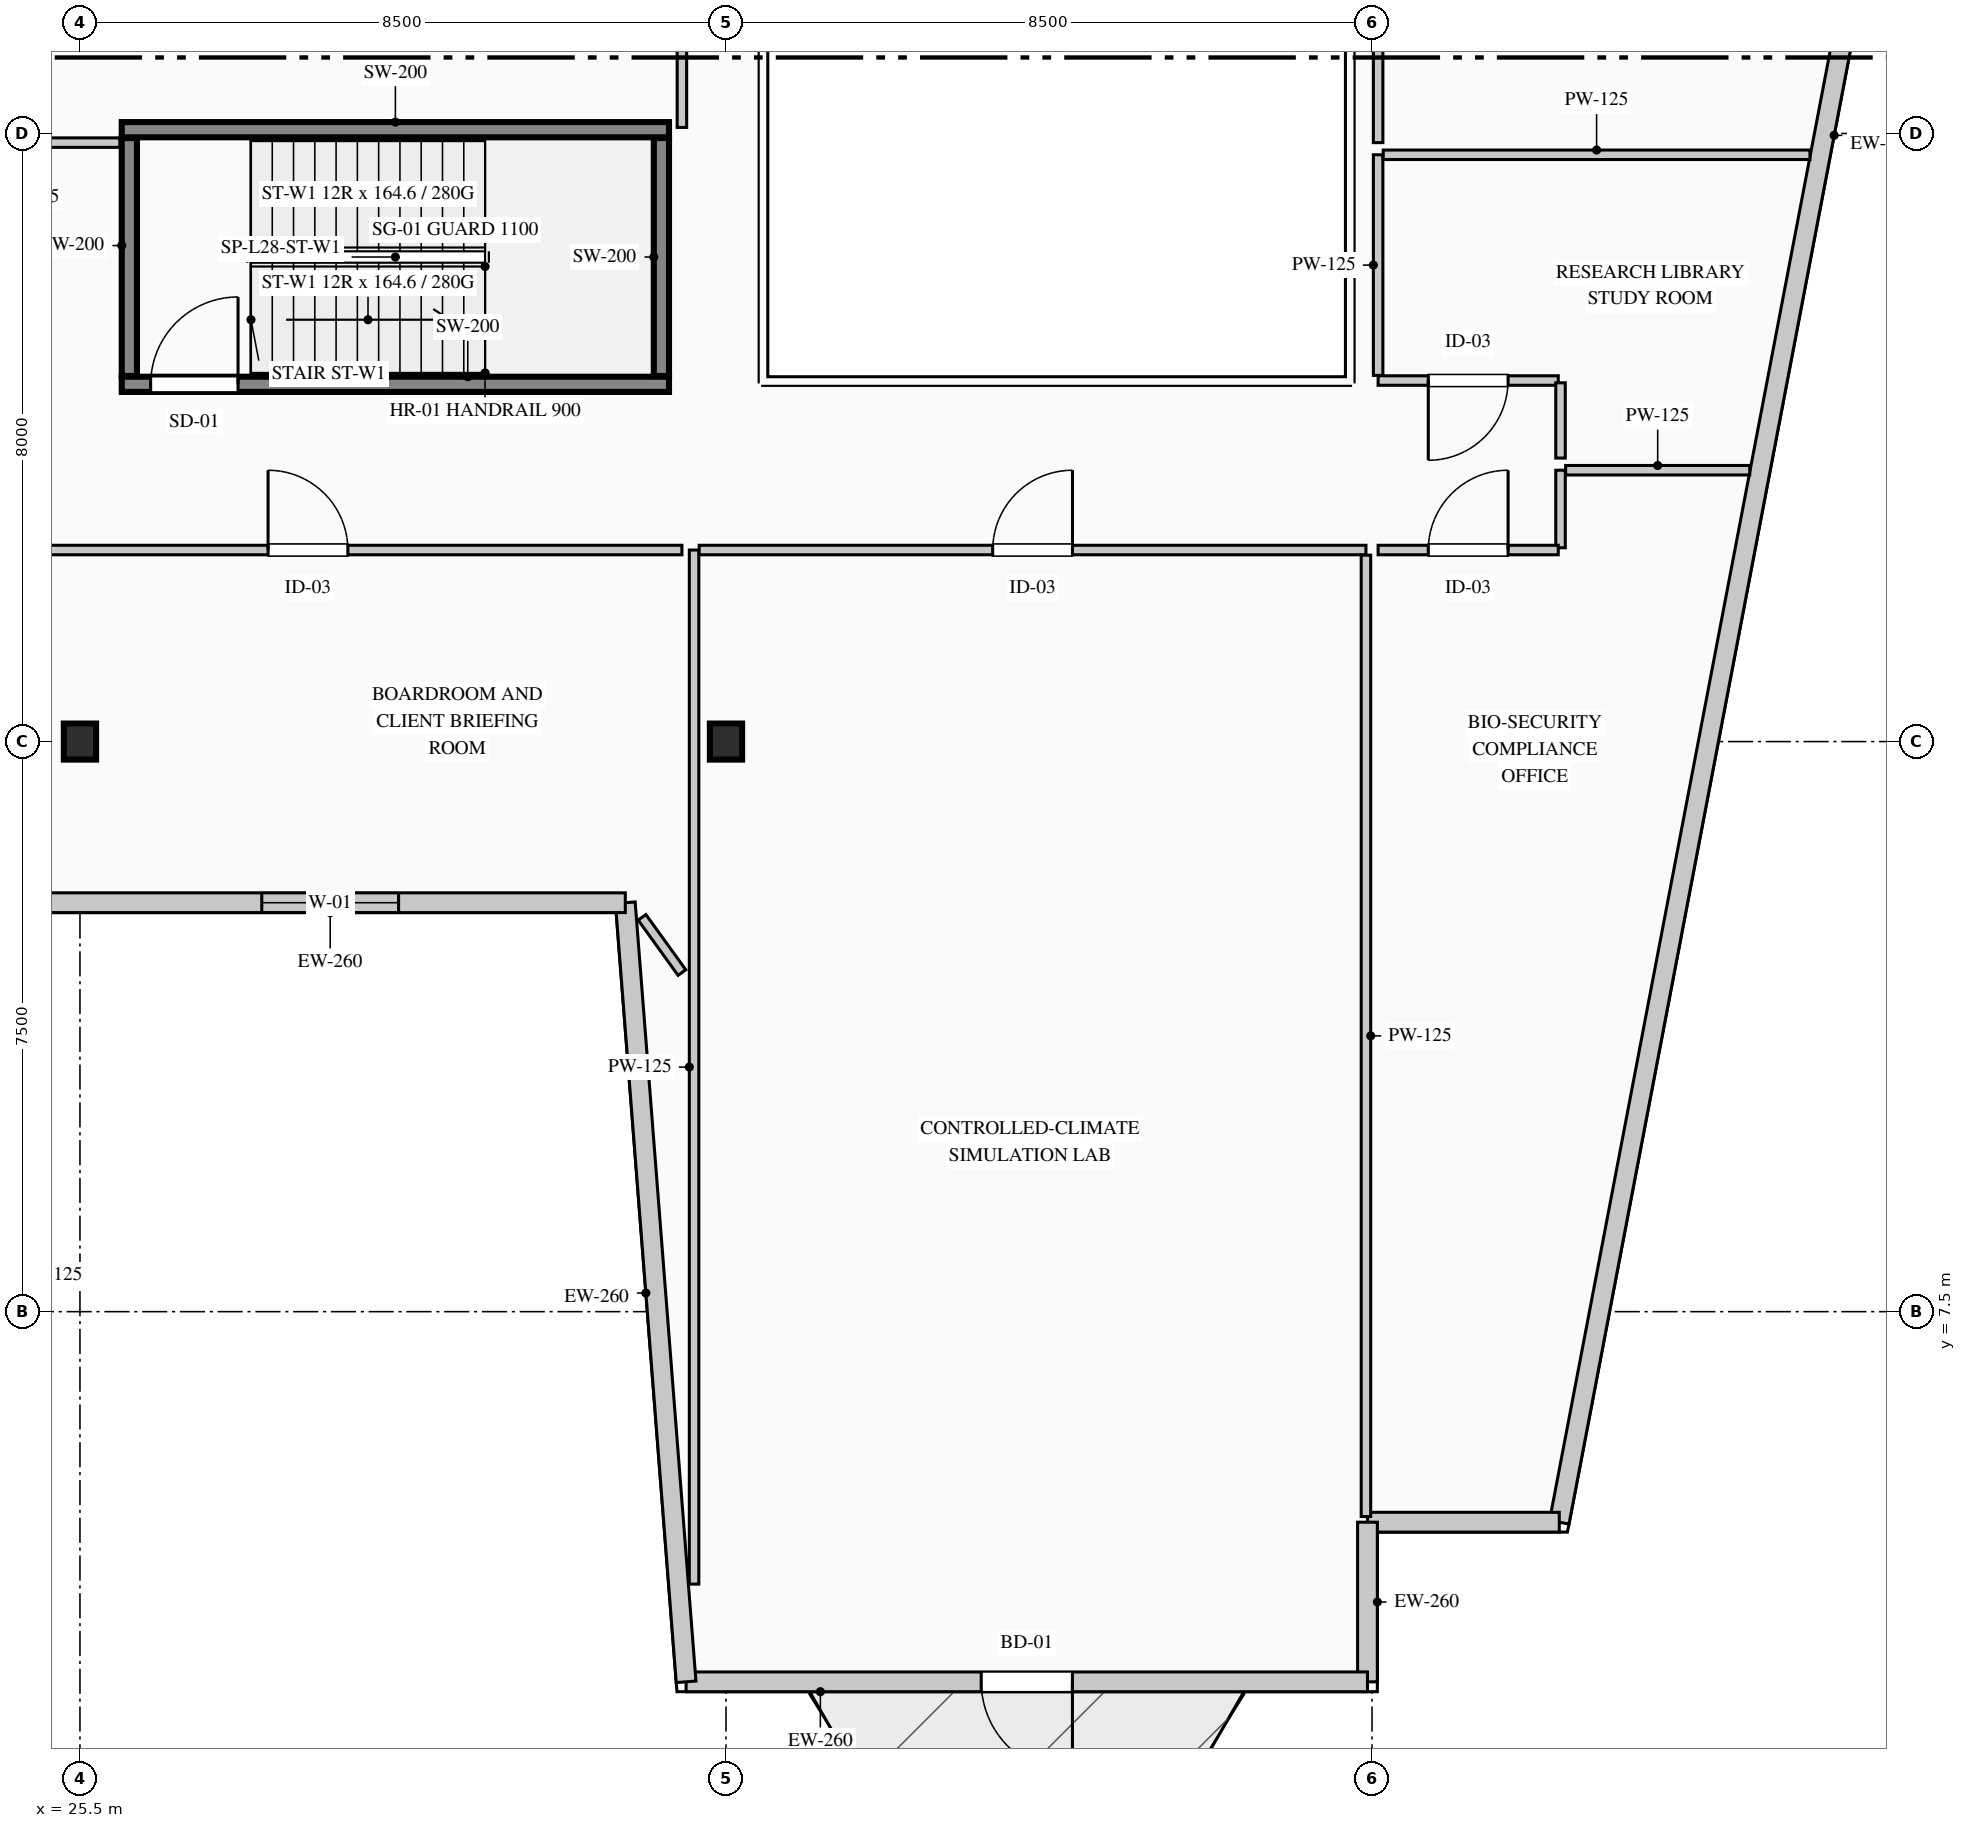
"""IFC4 building model, lengths in metres.
Left out: names, types, materials, properties, quantities, classifications, styles, units other than length and angle.
Written with IfcOpenShell. Run it as: python <this file> out.ifc"""

import sys

from ifc_helpers import new_model, si_unit, direction, frame, frame_2d, origin, origin_2d, place, context, subcontext, project, spatial, rectangle, i_section, extrude, element, fill, save


model = new_model("IFC4")
c1 = context("Model", 3, precision=1e-05, world=origin(), true_north=direction((0.0, 1.0)))
c2 = subcontext(c1, "Body", "Model", "MODEL_VIEW")
j1 = project(units=[si_unit("LENGTHUNIT", "METRE"), si_unit("PLANEANGLEUNIT", "RADIAN")], contexts=[c1])
p1 = place(None, origin())
s1 = spatial("IfcSite", under=j1, at=p1, CompositionType="ELEMENT")
p2 = place(p1, origin())
s2 = spatial("IfcBuilding", under=s1, at=p2, CompositionType="ELEMENT")
p3 = place(p2, frame((0.0, 0.0, 123.25)))
s3 = spatial("IfcBuildingStorey", under=s2, at=p3, CompositionType="ELEMENT", Elevation=123.25)
p4 = place(p3, frame((26.05, 19.7, 0.0), z_axis=(0.0, 0.0, 1.0), x_axis=(1.0, 0.0, 0.0)))
e1 = element("IfcWall", 1, at=p4, inside=s3, PredefinedType="SHEAR", context=c2, shape_type="SweptSolid", body=[
    extrude(rectangle(XDim=7.2, YDim=0.2, at=frame_2d((3.6, 0.0))), origin(), (0.0, 0.0, 1.0), 3.95),
])
p5 = place(p4, frame((0.38, 0.0, 0.0)))
e2 = element("IfcOpeningElement", 2, at=p5, cuts=e1, PredefinedType="OPENING", context=c2, shape_type="SweptSolid", body=[
    extrude(rectangle(XDim=1.15, YDim=2.2, at=frame_2d((0.575, 1.1))), frame((0.0, 0.11, 0.0), z_axis=(0.0, -1.0, 0.0), x_axis=(1.0, 0.0, 0.0)), (0.0, 0.0, 1.0), 0.22),
])
p6 = place(p3, frame((26.05, 23.05, 0.0), z_axis=(0.0, 0.0, 1.0), x_axis=(1.0, 0.0, 0.0)))
e3 = element("IfcWall", 3, at=p6, inside=s3, PredefinedType="SHEAR", context=c2, shape_type="SweptSolid", body=[
    extrude(rectangle(XDim=7.2, YDim=0.2, at=frame_2d((3.6, 0.0))), origin(), (0.0, 0.0, 1.0), 3.95),
])
for number, where, z_axis, x_axis in (
    (4, (26.15, 19.81, 0.0), (0.0, 0.0, 1.0), (0.0, 1.0, 0.0)),
    (5, (33.15, 19.81, 0.0), (0.0, 0.0, 1.0), (0.0, 1.0, 0.0)),
):
    element("IfcWall", number, at=place(p3, frame(where, z_axis=z_axis, x_axis=x_axis)), inside=s3, PredefinedType="SHEAR", context=c2, shape_type="SweptSolid", body=[
        extrude(rectangle(XDim=3.13, YDim=0.2, at=frame_2d((1.565, 0.0))), origin(), (0.0, 0.0, 1.0), 3.95),
    ])
for number, where, z_axis, x_axis in (
    (6, (25.5, 15.0, 0.0), (0.0, 0.0, 1.0), (1.0, 0.0, 0.0)),
    (7, (34.0, 15.0, 0.0), (0.0, 0.0, 1.0), (1.0, 0.0, 0.0)),
):
    element("IfcColumn", number, at=place(p3, frame(where, z_axis=z_axis, x_axis=x_axis)), inside=s3, PredefinedType="COLUMN", context=c2, shape_type="SweptSolid", body=[
        extrude(i_section(OverallWidth=0.424, OverallDepth=0.474, WebThickness=0.048, FlangeThickness=0.077, FilletRadius=0.015, at=origin_2d()), origin(), (0.0, 0.0, 1.0), 3.95),
    ])
p7 = place(p3, frame((51.942, 41.27, 0.0), z_axis=(0.0, 0.0, 1.0), x_axis=(-0.187592192405, -0.982247000173, 0.0)))
e8 = element("IfcWall", 8, at=p7, inside=s3, PredefinedType="STANDARD", context=c2, shape_type="SweptSolid", body=[
    extrude(rectangle(XDim=37.2, YDim=0.26, at=frame_2d((18.6, 0.0))), origin(), (0.0, 0.0, 1.0), 3.69),
])
p8 = place(p7, frame((12.342, 0.0, 0.9)))
e9 = element("IfcOpeningElement", 9, at=p8, cuts=e8, PredefinedType="OPENING", context=c2, shape_type="SweptSolid", body=[
    extrude(rectangle(XDim=2.1, YDim=2.0, at=frame_2d((1.05, 1.0))), frame((0.0, 0.14, 0.0), z_axis=(0.0, -1.0, 0.0), x_axis=(1.0, 0.0, 0.0)), (0.0, 0.0, 1.0), 0.28),
])
p9 = place(p3, frame((44.963, 4.73, 0.0), z_axis=(0.0, 0.0, 1.0), x_axis=(-1.0, 0.0, 0.0)))
e10 = element("IfcWall", 10, at=p9, inside=s3, PredefinedType="STANDARD", context=c2, shape_type="SweptSolid", body=[
    extrude(rectangle(XDim=2.523, YDim=0.26, at=frame_2d((1.262, 0.0))), origin(), (0.0, 0.0, 1.0), 3.69),
])
p10 = place(p3, frame((42.44, 4.73, 0.0), z_axis=(0.0, 0.0, 1.0), x_axis=(0.0, -1.0, 0.0)))
e11 = element("IfcWall", 11, at=p10, inside=s3, PredefinedType="STANDARD", context=c2, shape_type="SweptSolid", body=[
    extrude(rectangle(XDim=2.1, YDim=0.26, at=frame_2d((1.05, 0.0))), origin(), (0.0, 0.0, 1.0), 3.69),
])
p11 = place(p3, frame((42.44, 2.63, 0.0), z_axis=(0.0, 0.0, 1.0), x_axis=(-1.0, 0.0, 0.0)))
e12 = element("IfcWall", 12, at=p11, inside=s3, PredefinedType="STANDARD", context=c2, shape_type="SweptSolid", body=[
    extrude(rectangle(XDim=8.965, YDim=0.26, at=frame_2d((4.482, 0.0))), origin(), (0.0, 0.0, 1.0), 3.69),
])
p12 = place(p11, frame((3.882, 0.0, 0.0)))
e13 = element("IfcOpeningElement", 13, at=p12, cuts=e12, PredefinedType="OPENING", context=c2, shape_type="SweptSolid", body=[
    extrude(rectangle(XDim=1.2, YDim=2.2, at=frame_2d((0.6, 1.1))), frame((0.0, 0.14, 0.0), z_axis=(0.0, -1.0, 0.0), x_axis=(1.0, 0.0, 0.0)), (0.0, 0.0, 1.0), 0.28),
])
p13 = place(p3, frame((33.475, 2.63, 0.0), z_axis=(0.0, 0.0, 1.0), x_axis=(-0.077793257511, 0.996969512616, 0.0)))
e14 = element("IfcWall", 14, at=p13, inside=s3, PredefinedType="STANDARD", context=c2, shape_type="SweptSolid", body=[
    extrude(rectangle(XDim=10.281, YDim=0.26, at=frame_2d((5.141, 0.0))), origin(), (0.0, 0.0, 1.0), 3.69),
])
p14 = place(p3, frame((32.675, 12.88, 0.0), z_axis=(0.0, 0.0, 1.0), x_axis=(-1.0, 0.0, 0.0)))
e15 = element("IfcWall", 15, at=p14, inside=s3, PredefinedType="STANDARD", context=c2, shape_type="SweptSolid", body=[
    extrude(rectangle(XDim=7.765, YDim=0.26, at=frame_2d((3.883, 0.0))), origin(), (0.0, 0.0, 1.0), 3.69),
])
p15 = place(p14, frame((2.983, 0.0, 0.9)))
e16 = element("IfcOpeningElement", 16, at=p15, cuts=e15, PredefinedType="OPENING", context=c2, shape_type="SweptSolid", body=[
    extrude(rectangle(XDim=1.8, YDim=2.1, at=frame_2d((0.9, 1.05))), frame((0.0, 0.14, 0.0), z_axis=(0.0, -1.0, 0.0), x_axis=(1.0, 0.0, 0.0)), (0.0, 0.0, 1.0), 0.28),
])
p16 = place(p3, frame((33.58, 3.915, 0.0), z_axis=(0.0, 0.0, 1.0), x_axis=(0.0, 1.0, 0.0)))
e17 = element("IfcWall", 17, at=p16, inside=s3, PredefinedType="PARTITIONING", context=c2, shape_type="SweptSolid", body=[
    extrude(rectangle(XDim=13.605, YDim=0.125, at=frame_2d((6.802, 0.0))), origin(), (0.0, 0.0, 1.0), 3.69),
])
p17 = place(p3, frame((33.647, 17.52, 0.0), z_axis=(0.0, 0.0, 1.0), x_axis=(1.0, 0.0, 0.0)))
e18 = element("IfcWall", 18, at=p17, inside=s3, PredefinedType="PARTITIONING", context=c2, shape_type="SweptSolid", body=[
    extrude(rectangle(XDim=8.772, YDim=0.125, at=frame_2d((4.386, 0.0))), origin(), (0.0, 0.0, 1.0), 3.375),
])
p18 = place(p17, frame((3.861, 0.0, 0.0)))
e19 = element("IfcOpeningElement", 19, at=p18, cuts=e18, PredefinedType="OPENING", context=c2, shape_type="SweptSolid", body=[
    extrude(rectangle(XDim=1.05, YDim=2.15, at=frame_2d((0.525, 1.075))), frame((0.0, 0.073, 0.0), z_axis=(0.0, -1.0, 0.0), x_axis=(1.0, 0.0, 0.0)), (0.0, 0.0, 1.0), 0.145),
])
p19 = place(p3, frame((42.42, 17.452, 0.0), z_axis=(0.0, 0.0, 1.0), x_axis=(0.0, -1.0, 0.0)))
e20 = element("IfcWall", 20, at=p19, inside=s3, PredefinedType="PARTITIONING", context=c2, shape_type="SweptSolid", body=[
    extrude(rectangle(XDim=12.648, YDim=0.125, at=frame_2d((6.324, 0.0))), origin(), (0.0, 0.0, 1.0), 3.69),
])
p20 = place(p3, frame((44.98, 17.55, 0.0), z_axis=(0.0, 0.0, 1.0), x_axis=(0.0, 1.0, 0.0)))
e21 = element("IfcWall", 21, at=p20, inside=s3, PredefinedType="PARTITIONING", context=c2, shape_type="SweptSolid", body=[
    extrude(rectangle(XDim=1.02, YDim=0.125, at=frame_2d((0.51, 0.0))), origin(), (0.0, 0.0, 1.0), 3.69),
])
p21 = place(p3, frame((45.048, 18.57, 0.0), z_axis=(0.0, 0.0, 1.0), x_axis=(1.0, 0.0, 0.0)))
e22 = element("IfcWall", 22, at=p21, inside=s3, PredefinedType="PARTITIONING", context=c2, shape_type="SweptSolid", body=[
    extrude(rectangle(XDim=2.422, YDim=0.125, at=frame_2d((1.211, 0.0))), origin(), (0.0, 0.0, 1.0), 3.69),
])
p22 = place(p3, frame((42.58, 17.52, 0.0), z_axis=(0.0, 0.0, 1.0), x_axis=(1.0, 0.0, 0.0)))
e23 = element("IfcWall", 23, at=p22, inside=s3, PredefinedType="PARTITIONING", context=c2, shape_type="SweptSolid", body=[
    extrude(rectangle(XDim=2.37, YDim=0.125, at=frame_2d((1.185, 0.0))), origin(), (0.0, 0.0, 1.0), 3.69),
])
p23 = place(p22, frame((0.66, 0.0, 0.0)))
e24 = element("IfcOpeningElement", 24, at=p23, cuts=e23, PredefinedType="OPENING", context=c2, shape_type="SweptSolid", body=[
    extrude(rectangle(XDim=1.05, YDim=2.15, at=frame_2d((0.525, 1.075))), frame((0.0, 0.073, 0.0), z_axis=(0.0, -1.0, 0.0), x_axis=(1.0, 0.0, 0.0)), (0.0, 0.0, 1.0), 0.145),
])
p24 = place(p3, frame((33.42, 11.961, 0.0), z_axis=(0.0, 0.0, 1.0), x_axis=(-0.58517236533, 0.810908936228, 0.0)))
e25 = element("IfcWall", 25, at=p24, inside=s3, PredefinedType="PARTITIONING", context=c2, shape_type="SweptSolid", body=[
    extrude(rectangle(XDim=0.896, YDim=0.125, at=frame_2d((0.448, 0.0))), origin(), (0.0, 0.0, 1.0), 3.69),
])
p25 = place(p3, frame((23.58, 17.52, 0.0), z_axis=(0.0, 0.0, 1.0), x_axis=(1.0, 0.0, 0.0)))
e26 = element("IfcWall", 26, at=p25, inside=s3, PredefinedType="PARTITIONING", context=c2, shape_type="SweptSolid", body=[
    extrude(rectangle(XDim=9.84, YDim=0.125, at=frame_2d((4.92, 0.0))), origin(), (0.0, 0.0, 1.0), 3.375),
])
p26 = place(p25, frame((4.395, 0.0, 0.0)))
e27 = element("IfcOpeningElement", 27, at=p26, cuts=e26, PredefinedType="OPENING", context=c2, shape_type="SweptSolid", body=[
    extrude(rectangle(XDim=1.05, YDim=2.15, at=frame_2d((0.525, 1.075))), frame((0.0, 0.073, 0.0), z_axis=(0.0, -1.0, 0.0), x_axis=(1.0, 0.0, 0.0)), (0.0, 0.0, 1.0), 0.145),
])
p27 = place(p3, frame((44.95, 19.75, 0.0), z_axis=(0.0, 0.0, 1.0), x_axis=(-1.0, 0.0, 0.0)))
e28 = element("IfcWall", 28, at=p27, inside=s3, PredefinedType="PARTITIONING", context=c2, shape_type="SweptSolid", body=[
    extrude(rectangle(XDim=2.37, YDim=0.125, at=frame_2d((1.185, 0.0))), origin(), (0.0, 0.0, 1.0), 3.69),
])
p28 = place(p27, frame((0.66, 0.0, 0.0)))
e29 = element("IfcOpeningElement", 29, at=p28, cuts=e28, PredefinedType="OPENING", context=c2, shape_type="SweptSolid", body=[
    extrude(rectangle(XDim=1.05, YDim=2.15, at=frame_2d((0.525, 1.075))), frame((0.0, 0.073, 0.0), z_axis=(0.0, -1.0, 0.0), x_axis=(1.0, 0.0, 0.0)), (0.0, 0.0, 1.0), 0.145),
])
p29 = place(p3, frame((42.58, 19.817, 0.0), z_axis=(0.0, 0.0, 1.0), x_axis=(0.0, 1.0, 0.0)))
e30 = element("IfcWall", 30, at=p29, inside=s3, PredefinedType="PARTITIONING", context=c2, shape_type="SweptSolid", body=[
    extrude(rectangle(XDim=2.903, YDim=0.125, at=frame_2d((1.451, 0.0))), origin(), (0.0, 0.0, 1.0), 3.69),
])
p30 = place(p3, frame((42.647, 22.72, 0.0), z_axis=(0.0, 0.0, 1.0), x_axis=(1.0, 0.0, 0.0)))
e31 = element("IfcWall", 31, at=p30, inside=s3, PredefinedType="PARTITIONING", context=c2, shape_type="SweptSolid", body=[
    extrude(rectangle(XDim=5.614, YDim=0.125, at=frame_2d((2.807, 0.0))), origin(), (0.0, 0.0, 1.0), 3.69),
])
p31 = place(p3, frame((44.98, 18.73, 0.0), z_axis=(0.0, 0.0, 1.0), x_axis=(0.0, 1.0, 0.0)))
e32 = element("IfcWall", 32, at=p31, inside=s3, PredefinedType="PARTITIONING", context=c2, shape_type="SweptSolid", body=[
    extrude(rectangle(XDim=0.99, YDim=0.125, at=frame_2d((0.495, 0.0))), origin(), (0.0, 0.0, 1.0), 3.69),
])
p32 = place(p3, frame((26.025, 22.88, 0.0), z_axis=(0.0, 0.0, 1.0), x_axis=(-1.0, 0.0, 0.0)))
e33 = element("IfcWall", 33, at=p32, inside=s3, PredefinedType="PARTITIONING", context=c2, shape_type="SweptSolid", body=[
    extrude(rectangle(XDim=2.445, YDim=0.125, at=frame_2d((1.222, 0.0))), origin(), (0.0, 0.0, 1.0), 3.69),
])
p33 = place(p3, frame((33.42, 28.502, 0.0), z_axis=(0.0, 0.0, 1.0), x_axis=(0.0, -1.0, 0.0)))
e34 = element("IfcWall", 34, at=p33, inside=s3, PredefinedType="PARTITIONING", context=c2, shape_type="SweptSolid", body=[
    extrude(rectangle(XDim=5.422, YDim=0.125, at=frame_2d((2.711, 0.0))), origin(), (0.0, 0.0, 1.0), 3.69),
])
p34 = place(p3, frame((42.58, 22.88, 0.0), z_axis=(0.0, 0.0, 1.0), x_axis=(0.0, 1.0, 0.0)))
e35 = element("IfcWall", 35, at=p34, inside=s3, PredefinedType="PARTITIONING", context=c2, shape_type="SweptSolid", body=[
    extrude(rectangle(XDim=5.729, YDim=0.125, at=frame_2d((2.865, 0.0))), origin(), (0.0, 0.0, 1.0), 3.69),
])
p35 = place(p12, origin())
e36 = element("IfcDoor", 36, at=p35, inside=s3, OperationType="SINGLE_SWING_LEFT", PredefinedType="DOOR", context=c2, shape_type="SweptSolid", body=[
    extrude(rectangle(XDim=1.2, YDim=2.2, at=frame_2d((0.6, 1.1))), frame((0.0, 0.025, 0.0), z_axis=(0.0, -1.0, 0.0), x_axis=(1.0, 0.0, 0.0)), (0.0, 0.0, 1.0), 0.05),
])
fill(e13, e36)
p36 = place(p15, origin())
e37 = element("IfcWindow", 37, at=p36, inside=s3, PartitioningType="SINGLE_PANEL", PredefinedType="WINDOW", context=c2, shape_type="SweptSolid", body=[
    extrude(rectangle(XDim=1.8, YDim=2.1, at=frame_2d((0.9, 1.05))), frame((0.0, 0.03, 0.0), z_axis=(0.0, -1.0, 0.0), x_axis=(1.0, 0.0, 0.0)), (0.0, 0.0, 1.0), 0.06),
])
fill(e16, e37)
p37 = place(p5, origin())
e38 = element("IfcDoor", 38, at=p37, inside=s3, OperationType="SINGLE_SWING_RIGHT", PredefinedType="DOOR", context=c2, shape_type="SweptSolid", body=[
    extrude(rectangle(XDim=1.15, YDim=2.2, at=frame_2d((0.575, 1.1))), frame((0.0, 0.025, 0.0), z_axis=(0.0, -1.0, 0.0), x_axis=(1.0, 0.0, 0.0)), (0.0, 0.0, 1.0), 0.05),
])
fill(e2, e38)
p38 = place(p18, origin())
e39 = element("IfcDoor", 39, at=p38, inside=s3, OperationType="SINGLE_SWING_RIGHT", PredefinedType="DOOR", context=c2, shape_type="SweptSolid", body=[
    extrude(rectangle(XDim=1.05, YDim=2.15, at=frame_2d((0.525, 1.075))), frame((0.0, 0.025, 0.0), z_axis=(0.0, -1.0, 0.0), x_axis=(1.0, 0.0, 0.0)), (0.0, 0.0, 1.0), 0.05),
])
fill(e19, e39)
p39 = place(p23, origin())
e40 = element("IfcDoor", 40, at=p39, inside=s3, OperationType="SINGLE_SWING_RIGHT", PredefinedType="DOOR", context=c2, shape_type="SweptSolid", body=[
    extrude(rectangle(XDim=1.05, YDim=2.15, at=frame_2d((0.525, 1.075))), frame((0.0, 0.025, 0.0), z_axis=(0.0, -1.0, 0.0), x_axis=(1.0, 0.0, 0.0)), (0.0, 0.0, 1.0), 0.05),
])
fill(e24, e40)
p40 = place(p26, origin())
e41 = element("IfcDoor", 41, at=p40, inside=s3, OperationType="SINGLE_SWING_LEFT", PredefinedType="DOOR", context=c2, shape_type="SweptSolid", body=[
    extrude(rectangle(XDim=1.05, YDim=2.15, at=frame_2d((0.525, 1.075))), frame((0.0, 0.025, 0.0), z_axis=(0.0, -1.0, 0.0), x_axis=(1.0, 0.0, 0.0)), (0.0, 0.0, 1.0), 0.05),
])
fill(e27, e41)
p41 = place(p28, origin())
e42 = element("IfcDoor", 42, at=p41, inside=s3, OperationType="SINGLE_SWING_RIGHT", PredefinedType="DOOR", context=c2, shape_type="SweptSolid", body=[
    extrude(rectangle(XDim=1.05, YDim=2.15, at=frame_2d((0.525, 1.075))), frame((0.0, 0.025, 0.0), z_axis=(0.0, -1.0, 0.0), x_axis=(1.0, 0.0, 0.0)), (0.0, 0.0, 1.0), 0.05),
])
fill(e29, e42)
save(model, sys.argv[1])
